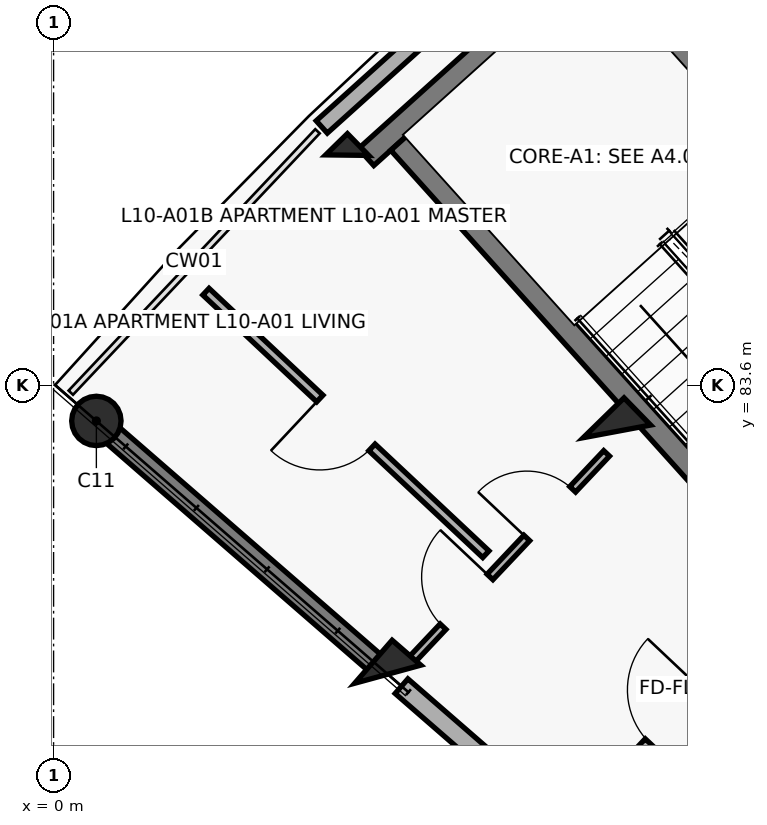
"""IFC4 building model, lengths in metres.
Left out: names, types, materials, properties, quantities, classifications, styles, units other than length and angle.
Written with IfcOpenShell. Run it as: python <this file> out.ifc"""

import sys

from ifc_helpers import new_model, si_unit, direction, frame, frame_2d, origin, origin_2d, place, context, subcontext, project, spatial, rectangle, circle, extrude, element, fill, save


model = new_model("IFC4")
c1 = context("Model", 3, precision=1e-05, world=origin(), true_north=direction((0.0, 1.0)))
c2 = subcontext(c1, "Body", "Model", "MODEL_VIEW")
j1 = project(units=[si_unit("LENGTHUNIT", "METRE"), si_unit("PLANEANGLEUNIT", "RADIAN")], contexts=[c1])
p1 = place(None, origin())
s1 = spatial("IfcSite", under=j1, at=p1, CompositionType="ELEMENT")
p2 = place(p1, origin())
s2 = spatial("IfcBuilding", under=s1, at=p2, CompositionType="ELEMENT")
p3 = place(p2, frame((0.0, 0.0, 32.9)))
s3 = spatial("IfcBuildingStorey", under=s2, at=p3, CompositionType="ELEMENT", Elevation=32.9)
p4 = place(p3, frame((4.397, 79.796, 0.0), z_axis=(0.0, 0.0, 1.0), x_axis=(-0.754709580223, 0.656059028991, 0.0)))
e1 = element("IfcColumn", 1, at=p4, inside=s3, PredefinedType="COLUMN", context=c2, shape_type="SweptSolid", body=[
    extrude(rectangle(XDim=0.5, YDim=0.75, at=origin_2d()), origin(), (0.0, 0.0, 1.0), 3.1),
])
p5 = place(p3, frame((0.563, 83.129, 0.0), z_axis=(0.0, 0.0, 1.0), x_axis=(-0.754709580223, 0.656059028991, 0.0)))
e2 = element("IfcColumn", 2, at=p5, inside=s3, PredefinedType="COLUMN", context=c2, shape_type="SweptSolid", body=[
    extrude(circle(Radius=0.325, at=origin_2d()), origin(), (0.0, 0.0, 1.0), 3.1),
])
p6 = place(p3, frame((7.412, 82.991, 0.0), z_axis=(0.0, 0.0, 1.0), x_axis=(-0.698665066769, 0.715448897181, 0.0)))
e3 = element("IfcColumn", 3, at=p6, inside=s3, PredefinedType="COLUMN", context=c2, shape_type="SweptSolid", body=[
    extrude(rectangle(XDim=0.5, YDim=0.75, at=origin_2d()), origin(), (0.0, 0.0, 1.0), 3.1),
])
p7 = place(p3, frame((3.863, 86.626, 0.0), z_axis=(0.0, 0.0, 1.0), x_axis=(-0.698665066769, 0.715448897181, 0.0)))
e4 = element("IfcColumn", 4, at=p7, inside=s3, PredefinedType="COLUMN", context=c2, shape_type="SweptSolid", body=[
    extrude(rectangle(XDim=0.4, YDim=0.4, at=origin_2d()), origin(), (0.0, 0.0, 1.0), 3.1),
])
p8 = place(p3, frame((4.261, 79.914, 0.0), z_axis=(0.0, 0.0, 1.0), x_axis=(-0.754703505217, 0.65606601742, 0.0)))
e5 = element("IfcWall", 5, at=p8, inside=s3, PredefinedType="SHEAR", context=c2, shape_type="SweptSolid", body=[
    extrude(rectangle(XDim=4.72, YDim=0.27, at=frame_2d((2.36, 0.0))), origin(), (0.0, 0.0, 1.0), 2.86),
])
p9 = place(p3, frame((3.528, 86.997, 0.0), z_axis=(0.0, 0.0, 1.0), x_axis=(0.743387539862, 0.668860946369, 0.0)))
e6 = element("IfcWall", 6, at=p9, inside=s3, PredefinedType="SOLIDWALL", context=c2, shape_type="SweptSolid", body=[
    extrude(rectangle(XDim=4.809, YDim=0.218, at=frame_2d((2.405, 0.0))), origin(), (0.0, 0.0, 1.0), 2.25),
])
p10 = place(p3, frame((10.766, 74.259, 0.0), z_axis=(0.0, 0.0, 1.0), x_axis=(-0.754717680958, 0.656049710044, 0.0)))
e7 = element("IfcWall", 7, at=p10, inside=s3, PredefinedType="SOLIDWALL", context=c2, shape_type="SweptSolid", body=[
    extrude(rectangle(XDim=8.2, YDim=0.255, at=frame_2d((4.1, 0.0))), origin(), (0.0, 0.0, 1.0), 2.18),
])
p11 = place(p10, frame((3.59, 0.0, 0.75)))
e8 = element("IfcOpeningElement", 8, at=p11, cuts=e7, PredefinedType="OPENING", context=c2, shape_type="SweptSolid", body=[
    extrude(rectangle(XDim=1.35, YDim=1.35, at=frame_2d((0.675, 0.675))), frame((0.0, 0.137, 0.0), z_axis=(0.0, -1.0, 0.0), x_axis=(1.0, 0.0, 0.0)), (0.0, 0.0, 1.0), 0.275),
])
p12 = place(p3, frame((7.436, 89.59, 0.0), z_axis=(0.0, 0.0, 1.0), x_axis=(-0.743400052815, -0.668847038922, 0.0)))
e9 = element("IfcWall", 9, at=p12, inside=s3, PredefinedType="SHEAR", context=c2, shape_type="SweptSolid", body=[
    extrude(rectangle(XDim=4.47, YDim=0.3, at=frame_2d((2.235, 0.0))), origin(), (0.0, 0.0, 1.0), 3.1),
])
p13 = place(p3, frame((12.345, 83.461, 0.0), z_axis=(0.0, 0.0, 1.0), x_axis=(-0.668868253964, 0.743380964808, 0.0)))
e10 = element("IfcWall", 10, at=p13, inside=s3, PredefinedType="SHEAR", context=c2, shape_type="SweptSolid", body=[
    extrude(rectangle(XDim=7.69, YDim=0.3, at=frame_2d((3.845, 0.0))), origin(), (0.0, 0.0, 1.0), 3.1),
])
p14 = place(p3, frame((9.691, 81.073, 0.0), z_axis=(0.0, 0.0, 1.0), x_axis=(-0.668885797871, 0.743365179038, 0.0)))
e11 = element("IfcWall", 11, at=p14, inside=s3, PredefinedType="SHEAR", context=c2, shape_type="SweptSolid", body=[
    extrude(rectangle(XDim=7.69, YDim=0.3, at=frame_2d((3.845, 0.0))), origin(), (0.0, 0.0, 1.0), 3.1),
])
p15 = place(p3, frame((7.014, 77.984, 0.0), z_axis=(0.0, 0.0, 1.0), x_axis=(0.686310507227, 0.727308660522, 0.0)))
e12 = element("IfcWall", 12, at=p15, inside=s3, PredefinedType="SOLIDWALL", context=c2, shape_type="SweptSolid", body=[
    extrude(rectangle(XDim=3.436, YDim=0.2, at=frame_2d((1.718, 0.0))), origin(), (0.0, 0.0, 1.0), 2.08),
])
p16 = place(p15, frame((1.228, 0.0, 0.0)))
e13 = element("IfcOpeningElement", 13, at=p16, cuts=e12, PredefinedType="OPENING", context=c2, shape_type="SweptSolid", body=[
    extrude(rectangle(XDim=0.98, YDim=2.15, at=frame_2d((0.49, 1.075))), frame((0.0, 0.11, 0.0), z_axis=(0.0, -1.0, 0.0), x_axis=(1.0, 0.0, 0.0)), (0.0, 0.0, 1.0), 0.22),
])
p17 = place(p3, frame((4.678, 79.948, 0.0), z_axis=(0.0, 0.0, 1.0), x_axis=(0.686331812627, 0.72728855551, 0.0)))
e14 = element("IfcWall", 14, at=p17, inside=s3, PredefinedType="PARTITIONING", context=c2, shape_type="SweptSolid", body=[
    extrude(rectangle(XDim=3.785, YDim=0.105, at=frame_2d((1.893, 0.0))), origin(), (0.0, 0.0, 1.0), 2.08),
])
p18 = place(p17, frame((0.65, 0.0, 0.0)))
e15 = element("IfcOpeningElement", 15, at=p18, cuts=e14, PredefinedType="OPENING", context=c2, shape_type="SweptSolid", body=[
    extrude(rectangle(XDim=0.9, YDim=2.1, at=frame_2d((0.45, 1.05))), frame((0.0, 0.062, 0.0), z_axis=(0.0, -1.0, 0.0), x_axis=(1.0, 0.0, 0.0)), (0.0, 0.0, 1.0), 0.125),
])
p19 = place(p17, frame((2.255, 0.0, 0.0)))
e16 = element("IfcOpeningElement", 16, at=p19, cuts=e14, PredefinedType="OPENING", context=c2, shape_type="SweptSolid", body=[
    extrude(rectangle(XDim=0.88, YDim=2.1, at=frame_2d((0.44, 1.05))), frame((0.0, 0.062, 0.0), z_axis=(0.0, -1.0, 0.0), x_axis=(1.0, 0.0, 0.0)), (0.0, 0.0, 1.0), 0.125),
])
p20 = place(p3, frame((5.688, 81.375, 0.0), z_axis=(0.0, 0.0, 1.0), x_axis=(-0.72936983679, 0.684119610288, 0.0)))
e17 = element("IfcWall", 17, at=p20, inside=s3, PredefinedType="PARTITIONING", context=c2, shape_type="SweptSolid", body=[
    extrude(rectangle(XDim=5.05, YDim=0.12, at=frame_2d((2.525, 0.0))), origin(), (0.0, 0.0, 1.0), 2.08),
])
p21 = place(p20, frame((2.055, 0.0, 0.0)))
e18 = element("IfcOpeningElement", 18, at=p21, cuts=e17, PredefinedType="OPENING", context=c2, shape_type="SweptSolid", body=[
    extrude(rectangle(XDim=0.94, YDim=2.1, at=frame_2d((0.47, 1.05))), frame((0.0, 0.07, 0.0), z_axis=(0.0, -1.0, 0.0), x_axis=(1.0, 0.0, 0.0)), (0.0, 0.0, 1.0), 0.14),
])
p22 = place(p16, origin())
e19 = element("IfcDoor", 19, at=p22, inside=s3, OperationType="SINGLE_SWING_RIGHT", PredefinedType="DOOR", context=c2, shape_type="SweptSolid", body=[
    extrude(rectangle(XDim=0.98, YDim=2.15, at=frame_2d((0.49, 1.075))), frame((0.0, 0.025, 0.0), z_axis=(0.0, -1.0, 0.0), x_axis=(1.0, 0.0, 0.0)), (0.0, 0.0, 1.0), 0.05),
])
fill(e13, e19)
p23 = place(p18, origin())
e20 = element("IfcDoor", 20, at=p23, inside=s3, OperationType="SINGLE_SWING_RIGHT", PredefinedType="DOOR", context=c2, shape_type="SweptSolid", body=[
    extrude(rectangle(XDim=0.9, YDim=2.1, at=frame_2d((0.45, 1.05))), frame((0.0, 0.025, 0.0), z_axis=(0.0, -1.0, 0.0), x_axis=(1.0, 0.0, 0.0)), (0.0, 0.0, 1.0), 0.05),
])
fill(e15, e20)
p24 = place(p19, origin())
e21 = element("IfcDoor", 21, at=p24, inside=s3, OperationType="SINGLE_SWING_LEFT", PredefinedType="DOOR", context=c2, shape_type="SweptSolid", body=[
    extrude(rectangle(XDim=0.88, YDim=2.1, at=frame_2d((0.44, 1.05))), frame((0.0, 0.025, 0.0), z_axis=(0.0, -1.0, 0.0), x_axis=(1.0, 0.0, 0.0)), (0.0, 0.0, 1.0), 0.05),
])
fill(e16, e21)
p25 = place(p21, origin())
e22 = element("IfcDoor", 22, at=p25, inside=s3, OperationType="SINGLE_SWING_RIGHT", PredefinedType="DOOR", context=c2, shape_type="SweptSolid", body=[
    extrude(rectangle(XDim=0.94, YDim=2.1, at=frame_2d((0.47, 1.05))), frame((0.0, 0.025, 0.0), z_axis=(0.0, -1.0, 0.0), x_axis=(1.0, 0.0, 0.0)), (0.0, 0.0, 1.0), 0.05),
])
fill(e18, e22)
save(model, sys.argv[1])
